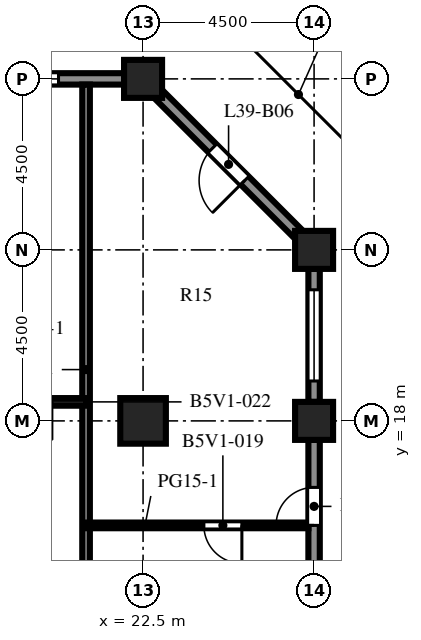
"""IFC4 building model, lengths in metres.
Left out: names, types, materials, properties, quantities, classifications, styles, units other than length and angle.
Written with IfcOpenShell. Run it as: python <this file> out.ifc"""

import sys

from ifc_helpers import new_model, si_unit, direction, frame, frame_2d, origin, origin_2d, place, context, subcontext, project, spatial, rectangle, extrude, element, fill, save


model = new_model("IFC4")
c1 = context("Model", 3, precision=1e-05, world=origin(), true_north=direction((0.0, 1.0)))
c2 = subcontext(c1, "Body", "Model", "MODEL_VIEW")
j1 = project(units=[si_unit("LENGTHUNIT", "METRE"), si_unit("PLANEANGLEUNIT", "RADIAN")], contexts=[c1])
p1 = place(None, origin())
s1 = spatial("IfcSite", under=j1, at=p1, CompositionType="ELEMENT")
p2 = place(p1, origin())
s2 = spatial("IfcBuilding", under=s1, at=p2, CompositionType="ELEMENT")
p3 = place(p2, frame((0.0, 0.0, 173.2)))
s3 = spatial("IfcBuildingStorey", under=s2, at=p3, CompositionType="ELEMENT", Elevation=173.2)
for number, where, z_axis, x_axis in (
    (1, (22.5, 27.0, 0.0), (0.0, 0.0, 1.0), (1.0, 0.0, 0.0)),
    (2, (27.0, 18.0, 0.0), (0.0, 0.0, 1.0), (1.0, 0.0, 0.0)),
    (3, (27.0, 22.5, 0.0), (0.0, 0.0, 1.0), (1.0, 0.0, 0.0)),
):
    element("IfcColumn", number, at=place(p3, frame(where, z_axis=z_axis, x_axis=x_axis)), inside=s3, PredefinedType="COLUMN", context=c2, shape_type="SweptSolid", body=[
        extrude(rectangle(XDim=1.0, YDim=1.0, at=origin_2d()), origin(), (0.0, 0.0, 1.0), 4.1),
    ])
p4 = place(p3, frame((22.5, 18.0, 0.0), z_axis=(0.0, 0.0, 1.0), x_axis=(1.0, 0.0, 0.0)))
e4 = element("IfcColumn", 4, at=p4, inside=s3, PredefinedType="COLUMN", context=c2, shape_type="SweptSolid", body=[
    extrude(rectangle(XDim=1.2, YDim=1.2, at=origin_2d()), origin(), (0.0, 0.0, 1.0), 4.1),
])
p5 = place(p3, frame((27.0, 17.5, 0.0), z_axis=(0.0, 0.0, 1.0), x_axis=(0.0, -1.0, 0.0)))
e5 = element("IfcWall", 5, at=p5, inside=s3, PredefinedType="SOLIDWALL", context=c2, shape_type="SweptSolid", body=[
    extrude(rectangle(XDim=3.5, YDim=0.3, at=frame_2d((1.75, 0.0))), origin(), (0.0, 0.0, 1.0), 2.85),
])
p6 = place(p5, frame((1.25, 0.0, 0.0)))
e6 = element("IfcOpeningElement", 6, at=p6, cuts=e5, PredefinedType="OPENING", context=c2, shape_type="SweptSolid", body=[
    extrude(rectangle(XDim=1.0, YDim=2.2, at=frame_2d((0.5, 1.1))), frame((0.0, 0.16, 0.0), z_axis=(0.0, -1.0, 0.0), x_axis=(1.0, 0.0, 0.0)), (0.0, 0.0, 1.0), 0.32),
])
p7 = place(p3, frame((27.0, 22.0, 0.0), z_axis=(0.0, 0.0, 1.0), x_axis=(0.0, -1.0, 0.0)))
e7 = element("IfcWall", 7, at=p7, inside=s3, PredefinedType="SOLIDWALL", context=c2, shape_type="SweptSolid", body=[
    extrude(rectangle(XDim=3.5, YDim=0.3, at=frame_2d((1.75, 0.0))), origin(), (0.0, 0.0, 1.0), 2.85),
])
p8 = place(p7, frame((0.55, 0.0, 0.8)))
e8 = element("IfcOpeningElement", 8, at=p8, cuts=e7, PredefinedType="OPENING", context=c2, shape_type="SweptSolid", body=[
    extrude(rectangle(XDim=2.4, YDim=1.7, at=frame_2d((1.2, 0.85))), frame((0.0, 0.16, 0.0), z_axis=(0.0, -1.0, 0.0), x_axis=(1.0, 0.0, 0.0)), (0.0, 0.0, 1.0), 0.32),
])
p9 = place(p3, frame((22.894, 26.606, 0.0), z_axis=(0.0, 0.0, 1.0), x_axis=(0.707106781187, -0.707106781187, 0.0)))
e9 = element("IfcWall", 9, at=p9, inside=s3, PredefinedType="SOLIDWALL", context=c2, shape_type="SweptSolid", body=[
    extrude(rectangle(XDim=5.25, YDim=0.3, at=frame_2d((2.625, 0.0))), origin(), (0.0, 0.0, 1.0), 2.85),
])
p10 = place(p9, frame((2.025, 0.0, 0.0)))
e10 = element("IfcOpeningElement", 10, at=p10, cuts=e9, PredefinedType="OPENING", context=c2, shape_type="SweptSolid", body=[
    extrude(rectangle(XDim=1.2, YDim=2.2, at=frame_2d((0.6, 1.1))), frame((0.0, 0.16, 0.0), z_axis=(0.0, -1.0, 0.0), x_axis=(1.0, 0.0, 0.0)), (0.0, 0.0, 1.0), 0.32),
])
p11 = place(p3, frame((18.5, 27.0, 0.0), z_axis=(0.0, 0.0, 1.0), x_axis=(1.0, 0.0, 0.0)))
e11 = element("IfcWall", 11, at=p11, inside=s3, PredefinedType="SOLIDWALL", context=c2, shape_type="SweptSolid", body=[
    extrude(rectangle(XDim=3.5, YDim=0.3, at=frame_2d((1.75, 0.0))), origin(), (0.0, 0.0, 1.0), 2.85),
])
p12 = place(p11, frame((0.575, 0.0, 0.8)))
e12 = element("IfcOpeningElement", 12, at=p12, cuts=e11, PredefinedType="OPENING", context=c2, shape_type="SweptSolid", body=[
    extrude(rectangle(XDim=1.2, YDim=1.7, at=frame_2d((0.6, 0.85))), frame((0.0, 0.16, 0.0), z_axis=(0.0, -1.0, 0.0), x_axis=(1.0, 0.0, 0.0)), (0.0, 0.0, 1.0), 0.32),
])
p13 = place(p3, frame((21.0, 26.85, 0.0), z_axis=(0.0, 0.0, 1.0), x_axis=(0.0, -1.0, 0.0)))
e13 = element("IfcWall", 13, at=p13, inside=s3, PredefinedType="PARTITIONING", context=c2, shape_type="SweptSolid", body=[
    extrude(rectangle(XDim=20.6, YDim=0.2, at=frame_2d((10.3, 0.0))), origin(), (0.0, 0.0, 1.0), 3.65),
])
p14 = place(p13, frame((15.0, 0.0, 0.0)))
e14 = element("IfcOpeningElement", 14, at=p14, cuts=e13, PredefinedType="OPENING", context=c2, shape_type="SweptSolid", body=[
    extrude(rectangle(XDim=1.0, YDim=2.1, at=frame_2d((0.5, 1.05))), frame((0.0, 0.11, 0.0), z_axis=(0.0, -1.0, 0.0), x_axis=(1.0, 0.0, 0.0)), (0.0, 0.0, 1.0), 0.22),
])
p15 = place(p3, frame((21.0, 15.25, 0.0), z_axis=(0.0, 0.0, 1.0), x_axis=(1.0, 0.0, 0.0)))
e15 = element("IfcWall", 15, at=p15, inside=s3, PredefinedType="PARTITIONING", context=c2, shape_type="SweptSolid", body=[
    extrude(rectangle(XDim=5.85, YDim=0.15, at=frame_2d((2.925, 0.0))), origin(), (0.0, 0.0, 1.0), 3.65),
])
p16 = place(p15, frame((3.1, 0.0, 0.0)))
e16 = element("IfcOpeningElement", 16, at=p16, cuts=e15, PredefinedType="OPENING", context=c2, shape_type="SweptSolid", body=[
    extrude(rectangle(XDim=1.0, YDim=2.1, at=frame_2d((0.5, 1.05))), frame((0.0, 0.085, 0.0), z_axis=(0.0, -1.0, 0.0), x_axis=(1.0, 0.0, 0.0)), (0.0, 0.0, 1.0), 0.17),
])
p17 = place(p3, frame((18.0, 18.5, 0.0), z_axis=(0.0, 0.0, 1.0), x_axis=(1.0, 0.0, 0.0)))
e17 = element("IfcWall", 17, at=p17, inside=s3, PredefinedType="PARTITIONING", context=c2, shape_type="SweptSolid", body=[
    extrude(rectangle(XDim=3.0, YDim=0.2, at=frame_2d((1.5, 0.0))), origin(), (0.0, 0.0, 1.0), 3.65),
])
p18 = place(p17, frame((1.1, 0.0, 0.0)))
e18 = element("IfcOpeningElement", 18, at=p18, cuts=e17, PredefinedType="OPENING", context=c2, shape_type="SweptSolid", body=[
    extrude(rectangle(XDim=1.0, YDim=2.1, at=frame_2d((0.5, 1.05))), frame((0.0, 0.11, 0.0), z_axis=(0.0, -1.0, 0.0), x_axis=(1.0, 0.0, 0.0)), (0.0, 0.0, 1.0), 0.22),
])
p19 = place(p6, origin())
e19 = element("IfcDoor", 19, at=p19, inside=s3, OperationType="SINGLE_SWING_RIGHT", PredefinedType="DOOR", context=c2, shape_type="SweptSolid", body=[
    extrude(rectangle(XDim=1.0, YDim=2.2, at=frame_2d((0.5, 1.1))), frame((0.0, 0.025, 0.0), z_axis=(0.0, -1.0, 0.0), x_axis=(1.0, 0.0, 0.0)), (0.0, 0.0, 1.0), 0.05),
])
fill(e6, e19)
p20 = place(p8, origin())
e20 = element("IfcWindow", 20, at=p20, inside=s3, PartitioningType="SINGLE_PANEL", PredefinedType="WINDOW", context=c2, shape_type="SweptSolid", body=[
    extrude(rectangle(XDim=2.4, YDim=1.7, at=frame_2d((1.2, 0.85))), frame((0.0, 0.03, 0.0), z_axis=(0.0, -1.0, 0.0), x_axis=(1.0, 0.0, 0.0)), (0.0, 0.0, 1.0), 0.06),
])
fill(e8, e20)
p21 = place(p10, origin())
e21 = element("IfcDoor", 21, at=p21, inside=s3, OperationType="SINGLE_SWING_RIGHT", PredefinedType="DOOR", context=c2, shape_type="SweptSolid", body=[
    extrude(rectangle(XDim=1.2, YDim=2.2, at=frame_2d((0.6, 1.1))), frame((0.0, 0.025, 0.0), z_axis=(0.0, -1.0, 0.0), x_axis=(1.0, 0.0, 0.0)), (0.0, 0.0, 1.0), 0.05),
])
fill(e10, e21)
p22 = place(p12, origin())
e22 = element("IfcWindow", 22, at=p22, inside=s3, PartitioningType="SINGLE_PANEL", PredefinedType="WINDOW", context=c2, shape_type="SweptSolid", body=[
    extrude(rectangle(XDim=1.2, YDim=1.7, at=frame_2d((0.6, 0.85))), frame((0.0, 0.03, 0.0), z_axis=(0.0, -1.0, 0.0), x_axis=(1.0, 0.0, 0.0)), (0.0, 0.0, 1.0), 0.06),
])
fill(e12, e22)
p23 = place(p16, origin())
e23 = element("IfcDoor", 23, at=p23, inside=s3, OperationType="SINGLE_SWING_RIGHT", PredefinedType="DOOR", context=c2, shape_type="SweptSolid", body=[
    extrude(rectangle(XDim=1.0, YDim=2.1, at=frame_2d((0.5, 1.05))), frame((0.0, 0.025, 0.0), z_axis=(0.0, -1.0, 0.0), x_axis=(1.0, 0.0, 0.0)), (0.0, 0.0, 1.0), 0.05),
])
fill(e16, e23)
save(model, sys.argv[1])
